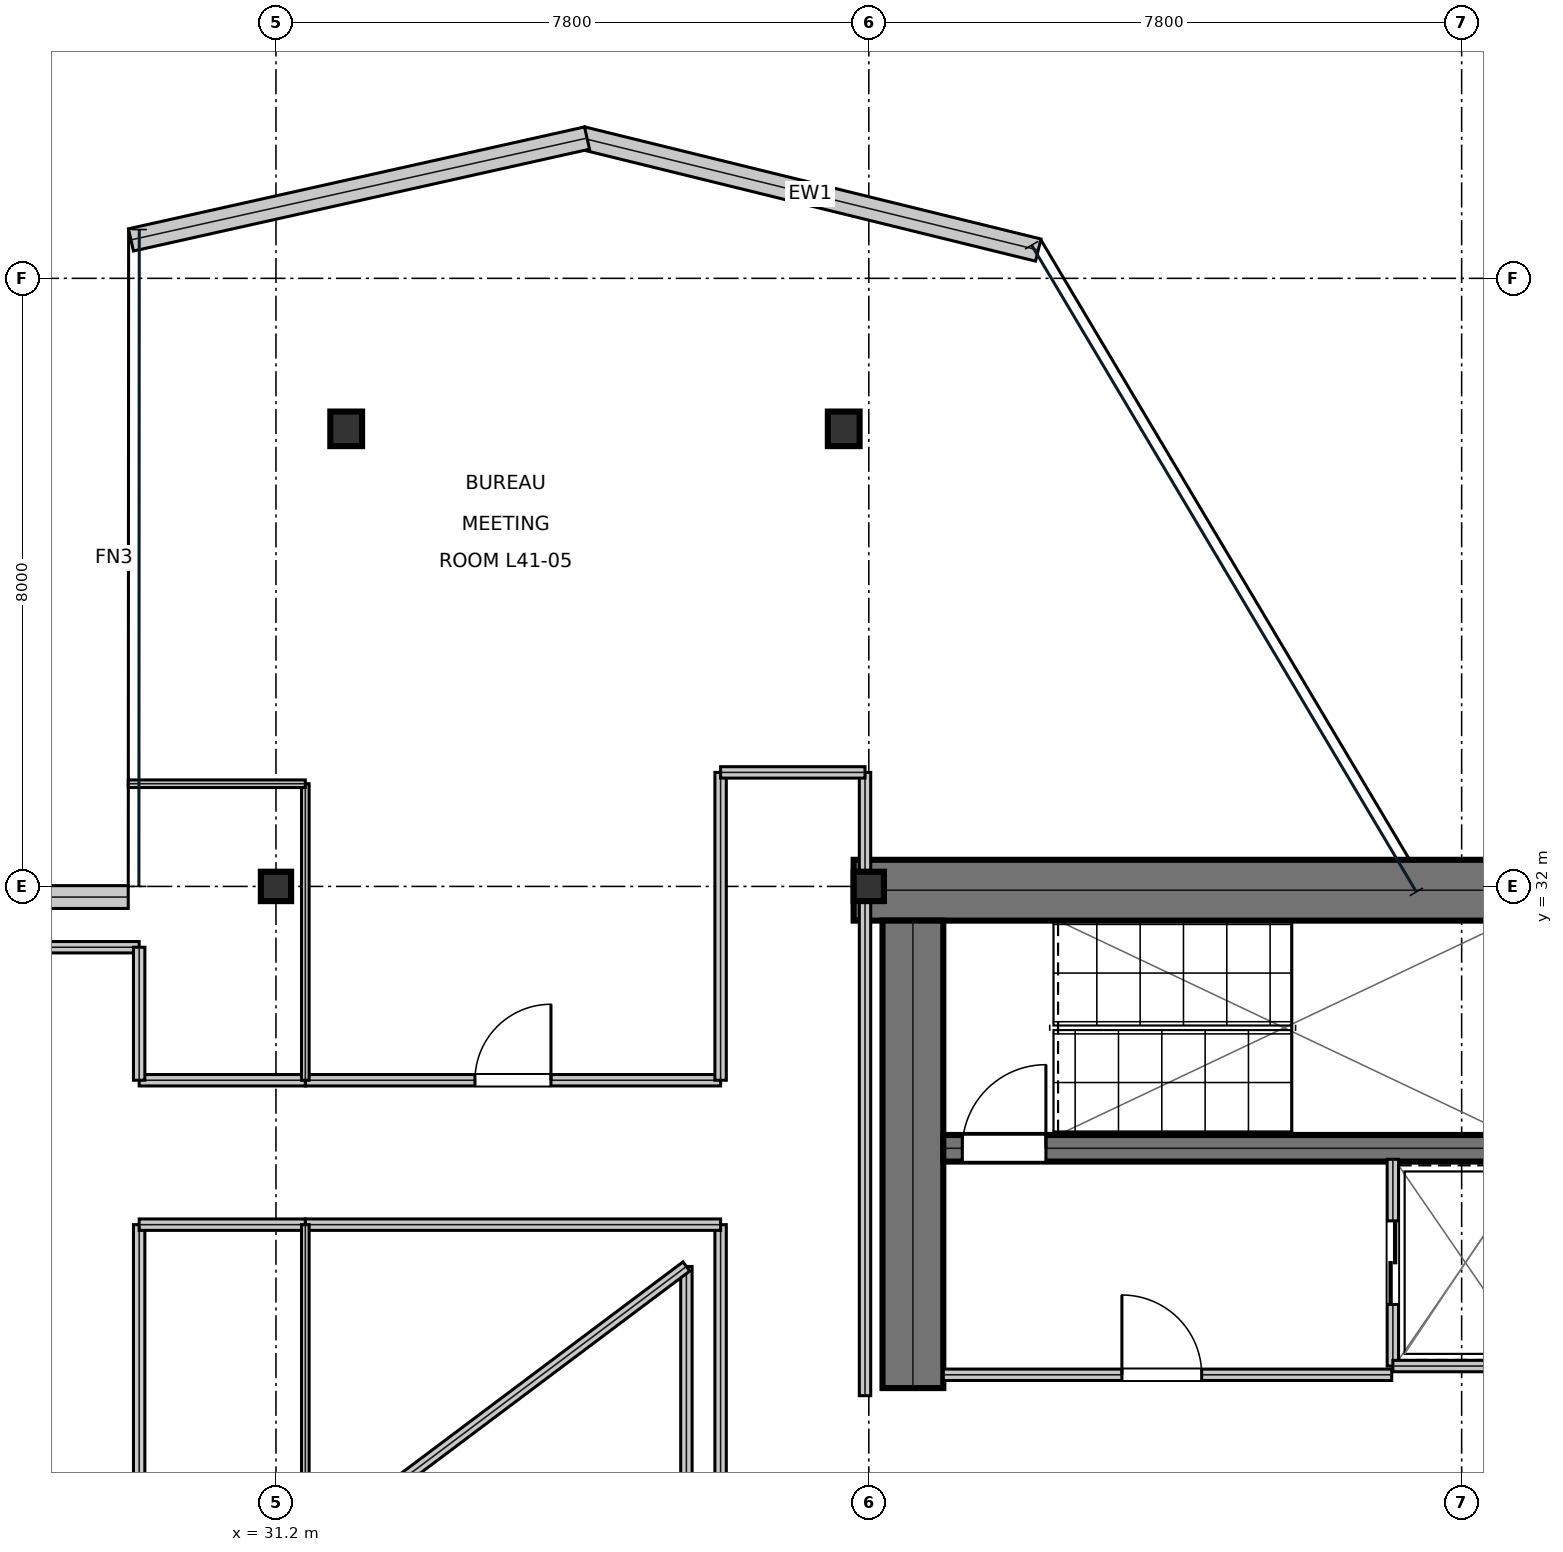
"""IFC4 building model, lengths in metres.
Left out: names, types, materials, properties, quantities, classifications, styles, units other than length and angle.
Written with IfcOpenShell. Run it as: python <this file> out.ifc"""

import sys

from ifc_helpers import new_model, si_unit, direction, frame, frame_2d, origin, origin_2d, place, context, subcontext, project, spatial, rectangle, i_section, extrude, element, fill, save


model = new_model("IFC4")
c1 = context("Model", 3, precision=1e-05, world=origin(), true_north=direction((0.0, 1.0)))
c2 = subcontext(c1, "Body", "Model", "MODEL_VIEW")
j1 = project(units=[si_unit("LENGTHUNIT", "METRE"), si_unit("PLANEANGLEUNIT", "RADIAN")], contexts=[c1])
p1 = place(None, origin())
s1 = spatial("IfcSite", under=j1, at=p1, CompositionType="ELEMENT")
p2 = place(p1, origin())
s2 = spatial("IfcBuilding", under=s1, at=p2, CompositionType="ELEMENT")
p3 = place(p2, frame((0.0, 0.0, 177.6)))
s3 = spatial("IfcBuildingStorey", under=s2, at=p3, CompositionType="ELEMENT", Elevation=177.6)
p4 = place(p3, frame((38.8, 31.95, 0.0), z_axis=(0.0, 0.0, 1.0), x_axis=(1.0, 0.0, 0.0)))
e1 = element("IfcWall", 1, at=p4, inside=s3, PredefinedType="SHEAR", context=c2, shape_type="SweptSolid", body=[
    extrude(rectangle(XDim=16.0, YDim=0.8, at=frame_2d((8.0, 0.0))), origin(), (0.0, 0.0, 1.0), 3.73),
])
p5 = place(p3, frame((39.58, 25.4, 0.0), z_axis=(0.0, 0.0, 1.0), x_axis=(0.0, 1.0, 0.0)))
e2 = element("IfcWall", 2, at=p5, inside=s3, PredefinedType="SHEAR", context=c2, shape_type="SweptSolid", body=[
    extrude(rectangle(XDim=6.15, YDim=0.8, at=frame_2d((3.075, 0.0))), origin(), (0.0, 0.0, 1.0), 3.73),
])
p6 = place(p3, frame((39.98, 28.555, 0.0), z_axis=(0.0, 0.0, 1.0), x_axis=(1.0, 0.0, 0.0)))
e3 = element("IfcWall", 3, at=p6, inside=s3, PredefinedType="SHEAR", context=c2, shape_type="SweptSolid", body=[
    extrude(rectangle(XDim=7.71, YDim=0.35, at=frame_2d((3.855, 0.0))), origin(), (0.0, 0.0, 1.0), 3.73),
])
p7 = place(p6, frame((0.25, 0.0, 0.0)))
e4 = element("IfcOpeningElement", 4, at=p7, cuts=e3, PredefinedType="OPENING", context=c2, shape_type="SweptSolid", body=[
    extrude(rectangle(XDim=1.1, YDim=2.15, at=frame_2d((0.55, 1.075))), frame((0.0, 0.185, 0.0), z_axis=(0.0, -1.0, 0.0), x_axis=(1.0, 0.0, 0.0)), (0.0, 0.0, 1.0), 0.37),
])
for number, where, z_axis, x_axis in (
    (5, (31.2, 32.0, 0.0), (0.0, 0.0, 1.0), (1.0, 0.0, 0.0)),
    (6, (39.0, 32.0, 0.0), (0.0, 0.0, 1.0), (1.0, 0.0, 0.0)),
):
    element("IfcColumn", number, at=place(p3, frame(where, z_axis=z_axis, x_axis=x_axis)), inside=s3, PredefinedType="COLUMN", context=c2, shape_type="SweptSolid", body=[
        extrude(i_section(OverallWidth=0.398, OverallDepth=0.387, WebThickness=0.021, FlangeThickness=0.033, at=origin_2d()), origin(), (0.0, 0.0, 1.0), 4.044),
    ])
p8 = place(p3, frame((32.124, 38.02, 0.016), z_axis=(0.010447648562, -0.022413850693, 0.999694186207), x_axis=(0.906371306068, 0.422482018004, 0.0)))
e7 = element("IfcColumn", 7, at=p8, inside=s3, PredefinedType="COLUMN", context=c2, shape_type="SweptSolid", body=[
    extrude(i_section(OverallWidth=0.418, OverallDepth=0.455, WebThickness=0.042, FlangeThickness=0.068, at=origin_2d()), origin(), (0.0, 0.0, 1.0), 4.019),
])
p9 = place(p3, frame((38.67, 38.02, 0.016), z_axis=(-0.00370544751, -0.022414920183, 0.999741887195), x_axis=(0.986609855888, -0.163098106258, 0.0)))
e8 = element("IfcColumn", 8, at=p9, inside=s3, PredefinedType="COLUMN", context=c2, shape_type="SweptSolid", body=[
    extrude(i_section(OverallWidth=0.418, OverallDepth=0.455, WebThickness=0.042, FlangeThickness=0.068, at=origin_2d()), origin(), (0.0, 0.0, 1.0), 4.019),
])
p10 = place(p3, frame((41.229, 40.372, 0.0), z_axis=(0.0, 0.0, 1.0), x_axis=(-0.971135940566, 0.238526696497, 0.0)))
e9 = element("IfcWall", 9, at=p10, inside=s3, PredefinedType="STANDARD", context=c2, shape_type="SweptSolid", body=[
    extrude(rectangle(XDim=6.179, YDim=0.3, at=frame_2d((3.09, 0.0))), origin(), (0.0, 0.0, 1.0), 3.73),
])
p11 = place(p3, frame((35.292, 41.845, 0.0), z_axis=(0.0, 0.0, 1.0), x_axis=(-0.975959494703, -0.217951977966, 0.0)))
e10 = element("IfcWall", 10, at=p11, inside=s3, PredefinedType="STANDARD", context=c2, shape_type="SweptSolid", body=[
    extrude(rectangle(XDim=6.148, YDim=0.3, at=frame_2d((3.074, 0.0))), origin(), (0.0, 0.0, 1.0), 3.73),
])
p12 = place(p3, frame((29.256, 31.86, 0.0), z_axis=(0.0, 0.0, 1.0), x_axis=(-1.0, 0.0, 0.0)))
e11 = element("IfcWall", 11, at=p12, inside=s3, PredefinedType="STANDARD", context=c2, shape_type="SweptSolid", body=[
    extrude(rectangle(XDim=2.8, YDim=0.3, at=frame_2d((1.4, 0.0))), origin(), (0.0, 0.0, 1.0), 3.73),
])
p13 = place(p3, frame((39.98, 25.575, 0.0), z_axis=(0.0, 0.0, 1.0), x_axis=(1.0, 0.0, 0.0)))
e12 = element("IfcWall", 12, at=p13, inside=s3, PredefinedType="PARTITIONING", context=c2, shape_type="SweptSolid", body=[
    extrude(rectangle(XDim=5.9, YDim=0.15, at=frame_2d((2.95, 0.0))), origin(), (0.0, 0.0, 1.0), 3.73),
])
p14 = place(p13, frame((2.35, 0.0, 0.0)))
e13 = element("IfcOpeningElement", 13, at=p14, cuts=e12, PredefinedType="OPENING", context=c2, shape_type="SweptSolid", body=[
    extrude(rectangle(XDim=1.05, YDim=2.15, at=frame_2d((0.525, 1.075))), frame((0.0, 0.085, 0.0), z_axis=(0.0, -1.0, 0.0), x_axis=(1.0, 0.0, 0.0)), (0.0, 0.0, 1.0), 0.17),
])
p15 = place(p3, frame((45.895, 25.69, 0.0), z_axis=(0.0, 0.0, 1.0), x_axis=(0.0, 1.0, 0.0)))
e14 = element("IfcWall", 14, at=p15, inside=s3, PredefinedType="PARTITIONING", context=c2, shape_type="SweptSolid", body=[
    extrude(rectangle(XDim=2.72, YDim=0.15, at=frame_2d((1.36, 0.0))), origin(), (0.0, 0.0, 1.0), 3.73),
])
p16 = place(p15, frame((0.81, 0.0, 0.0)))
e15 = element("IfcOpeningElement", 15, at=p16, cuts=e14, PredefinedType="OPENING", context=c2, shape_type="SweptSolid", body=[
    extrude(rectangle(XDim=1.1, YDim=2.15, at=frame_2d((0.55, 1.075))), frame((0.0, 0.085, 0.0), z_axis=(0.0, -1.0, 0.0), x_axis=(1.0, 0.0, 0.0)), (0.0, 0.0, 1.0), 0.17),
])
p17 = place(p3, frame((45.895, 25.69, 0.0), z_axis=(0.0, 0.0, 1.0), x_axis=(1.0, 0.0, 0.0)))
e16 = element("IfcWall", 16, at=p17, inside=s3, PredefinedType="PARTITIONING", context=c2, shape_type="SweptSolid", body=[
    extrude(rectangle(XDim=1.915, YDim=0.15, at=frame_2d((0.958, 0.0))), origin(), (0.0, 0.0, 1.0), 3.73),
])
p18 = place(p3, frame((37.05, 14.5, 0.0), z_axis=(0.0, 0.0, 1.0), x_axis=(0.0, 1.0, 0.0)))
e17 = element("IfcWall", 17, at=p18, inside=s3, PredefinedType="PARTITIONING", context=c2, shape_type="SweptSolid", body=[
    extrude(rectangle(XDim=13.05, YDim=0.15, at=frame_2d((6.525, 0.0))), origin(), (0.0, 0.0, 1.0), 3.11),
])
p19 = place(p18, frame((4.585, 0.0, 0.0)))
e18 = element("IfcOpeningElement", 18, at=p19, cuts=e17, PredefinedType="OPENING", context=c2, shape_type="SweptSolid", body=[
    extrude(rectangle(XDim=1.0, YDim=2.15, at=frame_2d((0.5, 1.075))), frame((0.0, 0.085, 0.0), z_axis=(0.0, -1.0, 0.0), x_axis=(1.0, 0.0, 0.0)), (0.0, 0.0, 1.0), 0.17),
])
p20 = place(p3, frame((29.4, 16.8, 0.0), z_axis=(0.0, 0.0, 1.0), x_axis=(0.0, 1.0, 0.0)))
e19 = element("IfcWall", 19, at=p20, inside=s3, PredefinedType="PARTITIONING", context=c2, shape_type="SweptSolid", body=[
    extrude(rectangle(XDim=10.75, YDim=0.15, at=frame_2d((5.375, 0.0))), origin(), (0.0, 0.0, 1.0), 3.11),
])
p21 = place(p20, frame((4.515, 0.0, 0.0)))
e20 = element("IfcOpeningElement", 20, at=p21, cuts=e19, PredefinedType="OPENING", context=c2, shape_type="SweptSolid", body=[
    extrude(rectangle(XDim=1.0, YDim=2.15, at=frame_2d((0.5, 1.075))), frame((0.0, 0.085, 0.0), z_axis=(0.0, -1.0, 0.0), x_axis=(1.0, 0.0, 0.0)), (0.0, 0.0, 1.0), 0.17),
])
p22 = place(p3, frame((31.586, 29.45, 0.0), z_axis=(0.0, 0.0, 1.0), x_axis=(1.0, 0.0, 0.0)))
e21 = element("IfcWall", 21, at=p22, inside=s3, PredefinedType="PARTITIONING", context=c2, shape_type="SweptSolid", body=[
    extrude(rectangle(XDim=5.464, YDim=0.15, at=frame_2d((2.732, 0.0))), origin(), (0.0, 0.0, 1.0), 3.73),
])
p23 = place(p22, frame((2.232, 0.0, 0.0)))
e22 = element("IfcOpeningElement", 22, at=p23, cuts=e21, PredefinedType="OPENING", context=c2, shape_type="SweptSolid", body=[
    extrude(rectangle(XDim=1.0, YDim=2.15, at=frame_2d((0.5, 1.075))), frame((0.0, 0.085, 0.0), z_axis=(0.0, -1.0, 0.0), x_axis=(1.0, 0.0, 0.0)), (0.0, 0.0, 1.0), 0.17),
])
p24 = place(p3, frame((31.586, 27.55, 0.0), z_axis=(0.0, 0.0, 1.0), x_axis=(1.0, 0.0, 0.0)))
e23 = element("IfcWall", 23, at=p24, inside=s3, PredefinedType="PARTITIONING", context=c2, shape_type="SweptSolid", body=[
    extrude(rectangle(XDim=5.464, YDim=0.15, at=frame_2d((2.732, 0.0))), origin(), (0.0, 0.0, 1.0), 3.363),
])
p25 = place(p3, frame((29.4, 27.55, 0.0), z_axis=(0.0, 0.0, 1.0), x_axis=(1.0, 0.0, 0.0)))
e24 = element("IfcWall", 24, at=p25, inside=s3, PredefinedType="PARTITIONING", context=c2, shape_type="SweptSolid", body=[
    extrude(rectangle(XDim=2.186, YDim=0.15, at=frame_2d((1.093, 0.0))), origin(), (0.0, 0.0, 1.0), 3.11),
])
p26 = place(p3, frame((26.596, 31.2, 0.0), z_axis=(0.0, 0.0, 1.0), x_axis=(1.0, 0.0, 0.0)))
e25 = element("IfcWall", 25, at=p26, inside=s3, PredefinedType="PARTITIONING", context=c2, shape_type="SweptSolid", body=[
    extrude(rectangle(XDim=2.804, YDim=0.15, at=frame_2d((1.402, 0.0))), origin(), (0.0, 0.0, 1.0), 3.258),
])
p27 = place(p3, frame((29.4, 29.45, 0.0), z_axis=(0.0, 0.0, 1.0), x_axis=(1.0, 0.0, 0.0)))
e26 = element("IfcWall", 26, at=p27, inside=s3, PredefinedType="PARTITIONING", context=c2, shape_type="SweptSolid", body=[
    extrude(rectangle(XDim=2.186, YDim=0.15, at=frame_2d((1.093, 0.0))), origin(), (0.0, 0.0, 1.0), 3.11),
])
p28 = place(p3, frame((29.4, 29.45, 0.0), z_axis=(0.0, 0.0, 1.0), x_axis=(0.0, 1.0, 0.0)))
e27 = element("IfcWall", 27, at=p28, inside=s3, PredefinedType="PARTITIONING", context=c2, shape_type="SweptSolid", body=[
    extrude(rectangle(XDim=1.75, YDim=0.15, at=frame_2d((0.875, 0.0))), origin(), (0.0, 0.0, 1.0), 3.73),
])
p29 = place(p3, frame((38.95, 25.3, 0.0), z_axis=(0.0, 0.0, 1.0), x_axis=(0.0, 1.0, 0.0)))
e28 = element("IfcWall", 28, at=p29, inside=s3, PredefinedType="PARTITIONING", context=c2, shape_type="SweptSolid", body=[
    extrude(rectangle(XDim=8.2, YDim=0.15, at=frame_2d((4.1, 0.0))), origin(), (0.0, 0.0, 1.0), 3.11),
])
p30 = place(p3, frame((37.05, 29.45, 0.0), z_axis=(0.0, 0.0, 1.0), x_axis=(0.0, 1.0, 0.0)))
e29 = element("IfcWall", 29, at=p30, inside=s3, PredefinedType="PARTITIONING", context=c2, shape_type="SweptSolid", body=[
    extrude(rectangle(XDim=4.05, YDim=0.15, at=frame_2d((2.025, 0.0))), origin(), (0.0, 0.0, 1.0), 3.11),
])
p31 = place(p3, frame((37.05, 33.5, 0.0), z_axis=(0.0, 0.0, 1.0), x_axis=(1.0, 0.0, 0.0)))
e30 = element("IfcWall", 30, at=p31, inside=s3, PredefinedType="PARTITIONING", context=c2, shape_type="SweptSolid", body=[
    extrude(rectangle(XDim=1.9, YDim=0.15, at=frame_2d((0.95, 0.0))), origin(), (0.0, 0.0, 1.0), 3.11),
])
p32 = place(p3, frame((31.586, 14.649, 0.0), z_axis=(0.0, 0.0, 1.0), x_axis=(0.0, 1.0, 0.0)))
e31 = element("IfcWall", 31, at=p32, inside=s3, PredefinedType="PARTITIONING", context=c2, shape_type="SweptSolid", body=[
    extrude(rectangle(XDim=12.901, YDim=0.1, at=frame_2d((6.451, 0.0))), origin(), (0.0, 0.0, 1.0), 3.11),
])
p33 = place(p3, frame((31.586, 29.45, 0.0), z_axis=(0.0, 0.0, 1.0), x_axis=(0.0, 1.0, 0.0)))
e32 = element("IfcWall", 32, at=p33, inside=s3, PredefinedType="PARTITIONING", context=c2, shape_type="SweptSolid", body=[
    extrude(rectangle(XDim=3.901, YDim=0.1, at=frame_2d((1.951, 0.0))), origin(), (0.0, 0.0, 1.0), 3.11),
])
p34 = place(p3, frame((29.257, 33.351, 0.0), z_axis=(0.0, 0.0, 1.0), x_axis=(1.0, 0.0, 0.0)))
e33 = element("IfcWall", 33, at=p34, inside=s3, PredefinedType="PARTITIONING", context=c2, shape_type="SweptSolid", body=[
    extrude(rectangle(XDim=2.329, YDim=0.1, at=frame_2d((1.165, 0.0))), origin(), (0.0, 0.0, 1.0), 3.73),
])
p35 = place(p3, frame((36.6, 21.0, 0.0), z_axis=(0.0, 0.0, 1.0), x_axis=(0.0, 1.0, 0.0)))
e34 = element("IfcWall", 34, at=p35, inside=s3, PredefinedType="MOVABLE", context=c2, shape_type="SweptSolid", body=[
    extrude(rectangle(XDim=6.0, YDim=0.15, at=frame_2d((3.0, 0.0))), origin(), (0.0, 0.0, 1.0), 3.73),
])
p36 = place(p3, frame((36.6, 27.0, 0.0), z_axis=(0.0, 0.0, 1.0), x_axis=(-0.8, -0.6, 0.0)))
e35 = element("IfcWall", 35, at=p36, inside=s3, PredefinedType="MOVABLE", context=c2, shape_type="SweptSolid", body=[
    extrude(rectangle(XDim=5.0, YDim=0.15, at=frame_2d((2.5, 0.0))), origin(), (0.0, 0.0, 1.0), 3.73),
])
p37 = place(p14, origin())
e36 = element("IfcDoor", 36, at=p37, inside=s3, OperationType="SINGLE_SWING_LEFT", PredefinedType="DOOR", context=c2, shape_type="SweptSolid", body=[
    extrude(rectangle(XDim=1.05, YDim=2.15, at=frame_2d((0.525, 1.075))), frame((0.0, 0.025, 0.0), z_axis=(0.0, -1.0, 0.0), x_axis=(1.0, 0.0, 0.0)), (0.0, 0.0, 1.0), 0.05),
])
fill(e13, e36)
p38 = place(p16, frame((1.1, 0.0, 0.0), z_axis=(0.0, 0.0, 1.0), x_axis=(-1.0, 0.0, 0.0)))
e37 = element("IfcDoor", 37, at=p38, inside=s3, OperationType="DOUBLE_DOOR_SLIDING", PredefinedType="DOOR", context=c2, shape_type="SweptSolid", body=[
    extrude(rectangle(XDim=1.1, YDim=2.15, at=frame_2d((0.55, 1.075))), frame((0.0, 0.025, 0.0), z_axis=(0.0, -1.0, 0.0), x_axis=(1.0, 0.0, 0.0)), (0.0, 0.0, 1.0), 0.05),
])
fill(e15, e37)
p39 = place(p23, origin())
e38 = element("IfcDoor", 38, at=p39, inside=s3, OperationType="SINGLE_SWING_RIGHT", PredefinedType="DOOR", context=c2, shape_type="SweptSolid", body=[
    extrude(rectangle(XDim=1.0, YDim=2.15, at=frame_2d((0.5, 1.075))), frame((0.0, 0.025, 0.0), z_axis=(0.0, -1.0, 0.0), x_axis=(1.0, 0.0, 0.0)), (0.0, 0.0, 1.0), 0.05),
])
fill(e22, e38)
p40 = place(p7, origin())
e39 = element("IfcDoor", 39, at=p40, inside=s3, OperationType="SINGLE_SWING_RIGHT", PredefinedType="DOOR", context=c2, shape_type="SweptSolid", body=[
    extrude(rectangle(XDim=1.1, YDim=2.15, at=frame_2d((0.55, 1.075))), frame((0.0, 0.025, 0.0), z_axis=(0.0, -1.0, 0.0), x_axis=(1.0, 0.0, 0.0)), (0.0, 0.0, 1.0), 0.05),
])
fill(e4, e39)
save(model, sys.argv[1])
